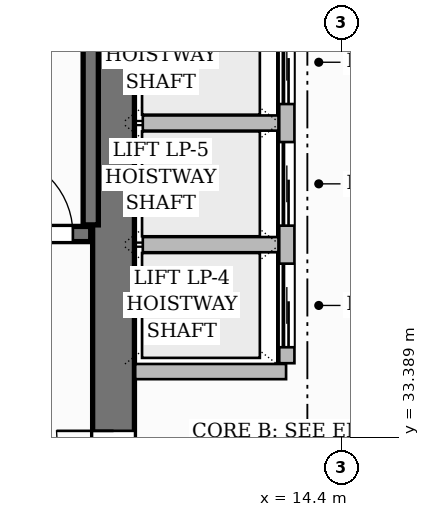
"""IFC4 building model, lengths in metres.
Left out: names, types, materials, properties, quantities, classifications, styles, units other than length and angle.
Written with IfcOpenShell. Run it as: python <this file> out.ifc"""

import sys

from ifc_helpers import new_model, si_unit, direction, frame, frame_2d, origin, place, context, subcontext, project, spatial, rectangle, extrude, source, transform, mapped, element, fill, save


model = new_model("IFC4")
c1 = context("Model", 3, precision=1e-05, world=origin(), true_north=direction((0.0, 1.0)))
c2 = subcontext(c1, "Body", "Model", "MODEL_VIEW")
j1 = project(units=[si_unit("LENGTHUNIT", "METRE"), si_unit("PLANEANGLEUNIT", "RADIAN")], contexts=[c1])
p1 = place(None, origin())
s1 = spatial("IfcSite", under=j1, at=p1, CompositionType="ELEMENT")
p2 = place(p1, origin())
s2 = spatial("IfcBuilding", under=s1, at=p2, CompositionType="ELEMENT")
p3 = place(p2, frame((0.0, 0.0, 119.2)))
s3 = spatial("IfcBuildingStorey", under=s2, at=p3, CompositionType="ELEMENT", Elevation=119.2)
p4 = place(p3, frame((11.4, 25.475, 0.0), z_axis=(0.0, 0.0, 1.0), x_axis=(0.0, 1.0, 0.0)))
e1 = element("IfcWall", 1, at=p4, inside=s3, PredefinedType="SHEAR", context=c2, shape_type="SweptSolid", body=[
    extrude(rectangle(XDim=13.85, YDim=0.55, at=frame_2d((6.925, 0.0))), origin(), (0.0, 0.0, 1.0), 3.7),
])
p5 = place(p4, frame((6.495, 0.0, 0.0)))
e2 = element("IfcOpeningElement", 2, at=p5, cuts=e1, PredefinedType="OPENING", context=c2, shape_type="SweptSolid", body=[
    extrude(rectangle(XDim=1.5, YDim=2.2, at=frame_2d((0.75, 1.1))), frame((0.0, 0.285, 0.0), z_axis=(0.0, -1.0, 0.0), x_axis=(1.0, 0.0, 0.0)), (0.0, 0.0, 1.0), 0.57),
])
p6 = place(p3, frame((11.1, 36.18, 0.0), z_axis=(0.0, 0.0, 1.0), x_axis=(0.0, 1.0, 0.0)))
e3 = element("IfcWall", 3, at=p6, inside=s3, PredefinedType="SHEAR", context=c2, shape_type="SweptSolid", body=[
    extrude(rectangle(XDim=2.7, YDim=0.2, at=frame_2d((1.35, 0.0))), origin(), (0.0, 0.0, 1.0), 3.7),
])
p7 = place(p3, frame((4.0, 36.06, 0.0), z_axis=(0.0, 0.0, 1.0), x_axis=(1.0, 0.0, 0.0)))
e4 = element("IfcWall", 4, at=p7, inside=s3, PredefinedType="SHEAR", context=c2, shape_type="SweptSolid", body=[
    extrude(rectangle(XDim=7.1, YDim=0.2, at=frame_2d((3.55, 0.0))), origin(), (0.0, 0.0, 1.0), 3.7),
])
p8 = place(p7, frame((5.815, 0.0, 0.0)))
e5 = element("IfcOpeningElement", 5, at=p8, cuts=e4, PredefinedType="OPENING", context=c2, shape_type="SweptSolid", body=[
    extrude(rectangle(XDim=1.05, YDim=2.2, at=frame_2d((0.525, 1.1))), frame((0.0, 0.11, 0.0), z_axis=(0.0, -1.0, 0.0), x_axis=(1.0, 0.0, 0.0)), (0.0, 0.0, 1.0), 0.22),
])
p9 = place(p3, frame((11.685, 34.25, 0.0), z_axis=(0.0, 0.0, 1.0), x_axis=(1.0, 0.0, 0.0)))
e6 = element("IfcWall", 6, at=p9, inside=s3, PredefinedType="PARTITIONING", context=c2, shape_type="SweptSolid", body=[
    extrude(rectangle(XDim=1.985, YDim=0.2, at=frame_2d((0.992, 0.0))), origin(), (0.0, 0.0, 1.0), 3.45),
])
p10 = place(p3, frame((13.68, 34.36, 0.0), z_axis=(0.0, 0.0, 1.0), x_axis=(0.0, 1.0, 0.0)))
e7 = element("IfcWall", 7, at=p10, inside=s3, PredefinedType="PARTITIONING", context=c2, shape_type="SweptSolid", body=[
    extrude(rectangle(XDim=4.72, YDim=0.2, at=frame_2d((2.36, 0.0))), origin(), (0.0, 0.0, 1.0), 3.45),
])
p11 = place(p10, frame((0.21, 0.0, 0.0)))
e8 = element("IfcOpeningElement", 8, at=p11, cuts=e7, PredefinedType="OPENING", context=c2, shape_type="SweptSolid", body=[
    extrude(rectangle(XDim=1.1, YDim=2.2, at=frame_2d((0.55, 1.1))), frame((0.0, 0.11, 0.0), z_axis=(0.0, -1.0, 0.0), x_axis=(1.0, 0.0, 0.0)), (0.0, 0.0, 1.0), 0.22),
])
p12 = place(p10, frame((1.81, 0.0, 0.0)))
e9 = element("IfcOpeningElement", 9, at=p12, cuts=e7, PredefinedType="OPENING", context=c2, shape_type="SweptSolid", body=[
    extrude(rectangle(XDim=1.1, YDim=2.2, at=frame_2d((0.55, 1.1))), frame((0.0, 0.11, 0.0), z_axis=(0.0, -1.0, 0.0), x_axis=(1.0, 0.0, 0.0)), (0.0, 0.0, 1.0), 0.22),
])
p13 = place(p10, frame((3.41, 0.0, 0.0)))
e10 = element("IfcOpeningElement", 10, at=p13, cuts=e7, PredefinedType="OPENING", context=c2, shape_type="SweptSolid", body=[
    extrude(rectangle(XDim=1.1, YDim=2.2, at=frame_2d((0.55, 1.1))), frame((0.0, 0.11, 0.0), z_axis=(0.0, -1.0, 0.0), x_axis=(1.0, 0.0, 0.0)), (0.0, 0.0, 1.0), 0.22),
])
for number, where, z_axis, x_axis in (
    (11, (11.785, 35.92, 0.0), (0.0, 0.0, 1.0), (1.0, 0.0, 0.0)),
    (12, (11.785, 37.52, 0.0), (0.0, 0.0, 1.0), (1.0, 0.0, 0.0)),
):
    element("IfcWall", number, at=place(p3, frame(where, z_axis=z_axis, x_axis=x_axis)), inside=s3, PredefinedType="PARTITIONING", context=c2, shape_type="SweptSolid", body=[
        extrude(rectangle(XDim=1.785, YDim=0.2, at=frame_2d((0.893, 0.0))), origin(), (0.0, 0.0, 1.0), 3.45),
    ])
m1 = source(origin(), c2, "Body", "SweptSolid", [
    extrude(rectangle(XDim=1.05, YDim=2.2, at=frame_2d((0.525, 1.1))), frame((0.0, 0.025, 0.0), z_axis=(0.0, -1.0, 0.0), x_axis=(1.0, 0.0, 0.0)), (0.0, 0.0, 1.0), 0.05),
])
p14 = place(p8, origin())
e13 = element("IfcDoor", 13, at=p14, inside=s3, OperationType="SINGLE_SWING_LEFT", PredefinedType="DOOR", context=c2, shape_type="MappedRepresentation", body=[
    mapped(m1, transform((0.0, 0.0, 0.0), scale=1.0)),
])
fill(e5, e13)
m2 = source(origin(), c2, "Body", "SweptSolid", [
    extrude(rectangle(XDim=1.5, YDim=2.2, at=frame_2d((0.75, 1.1))), frame((0.0, 0.025, 0.0), z_axis=(0.0, -1.0, 0.0), x_axis=(1.0, 0.0, 0.0)), (0.0, 0.0, 1.0), 0.05),
])
p15 = place(p5, origin())
e14 = element("IfcDoor", 14, at=p15, inside=s3, OperationType="DOUBLE_DOOR_SINGLE_SWING", PredefinedType="DOOR", context=c2, shape_type="MappedRepresentation", body=[
    mapped(m2, transform((0.0, 0.0, 0.0), scale=1.0)),
])
fill(e2, e14)
m3 = source(origin(), c2, "Body", "SweptSolid", [
    extrude(rectangle(XDim=1.1, YDim=2.2, at=frame_2d((0.55, 1.1))), frame((0.0, 0.025, 0.0), z_axis=(0.0, -1.0, 0.0), x_axis=(1.0, 0.0, 0.0)), (0.0, 0.0, 1.0), 0.05),
])
p16 = place(p11, origin())
e15 = element("IfcDoor", 15, at=p16, inside=s3, OperationType="SLIDING_TO_LEFT", PredefinedType="DOOR", context=c2, shape_type="MappedRepresentation", body=[
    mapped(m3, transform((0.0, 0.0, 0.0), scale=1.0)),
])
fill(e8, e15)
p17 = place(p12, origin())
e16 = element("IfcDoor", 16, at=p17, inside=s3, OperationType="SLIDING_TO_LEFT", PredefinedType="DOOR", context=c2, shape_type="MappedRepresentation", body=[
    mapped(m3, transform((0.0, 0.0, 0.0), scale=1.0)),
])
fill(e9, e16)
p18 = place(p13, origin())
e17 = element("IfcDoor", 17, at=p18, inside=s3, OperationType="SLIDING_TO_LEFT", PredefinedType="DOOR", context=c2, shape_type="MappedRepresentation", body=[
    mapped(m3, transform((0.0, 0.0, 0.0), scale=1.0)),
])
fill(e10, e17)
save(model, sys.argv[1])
